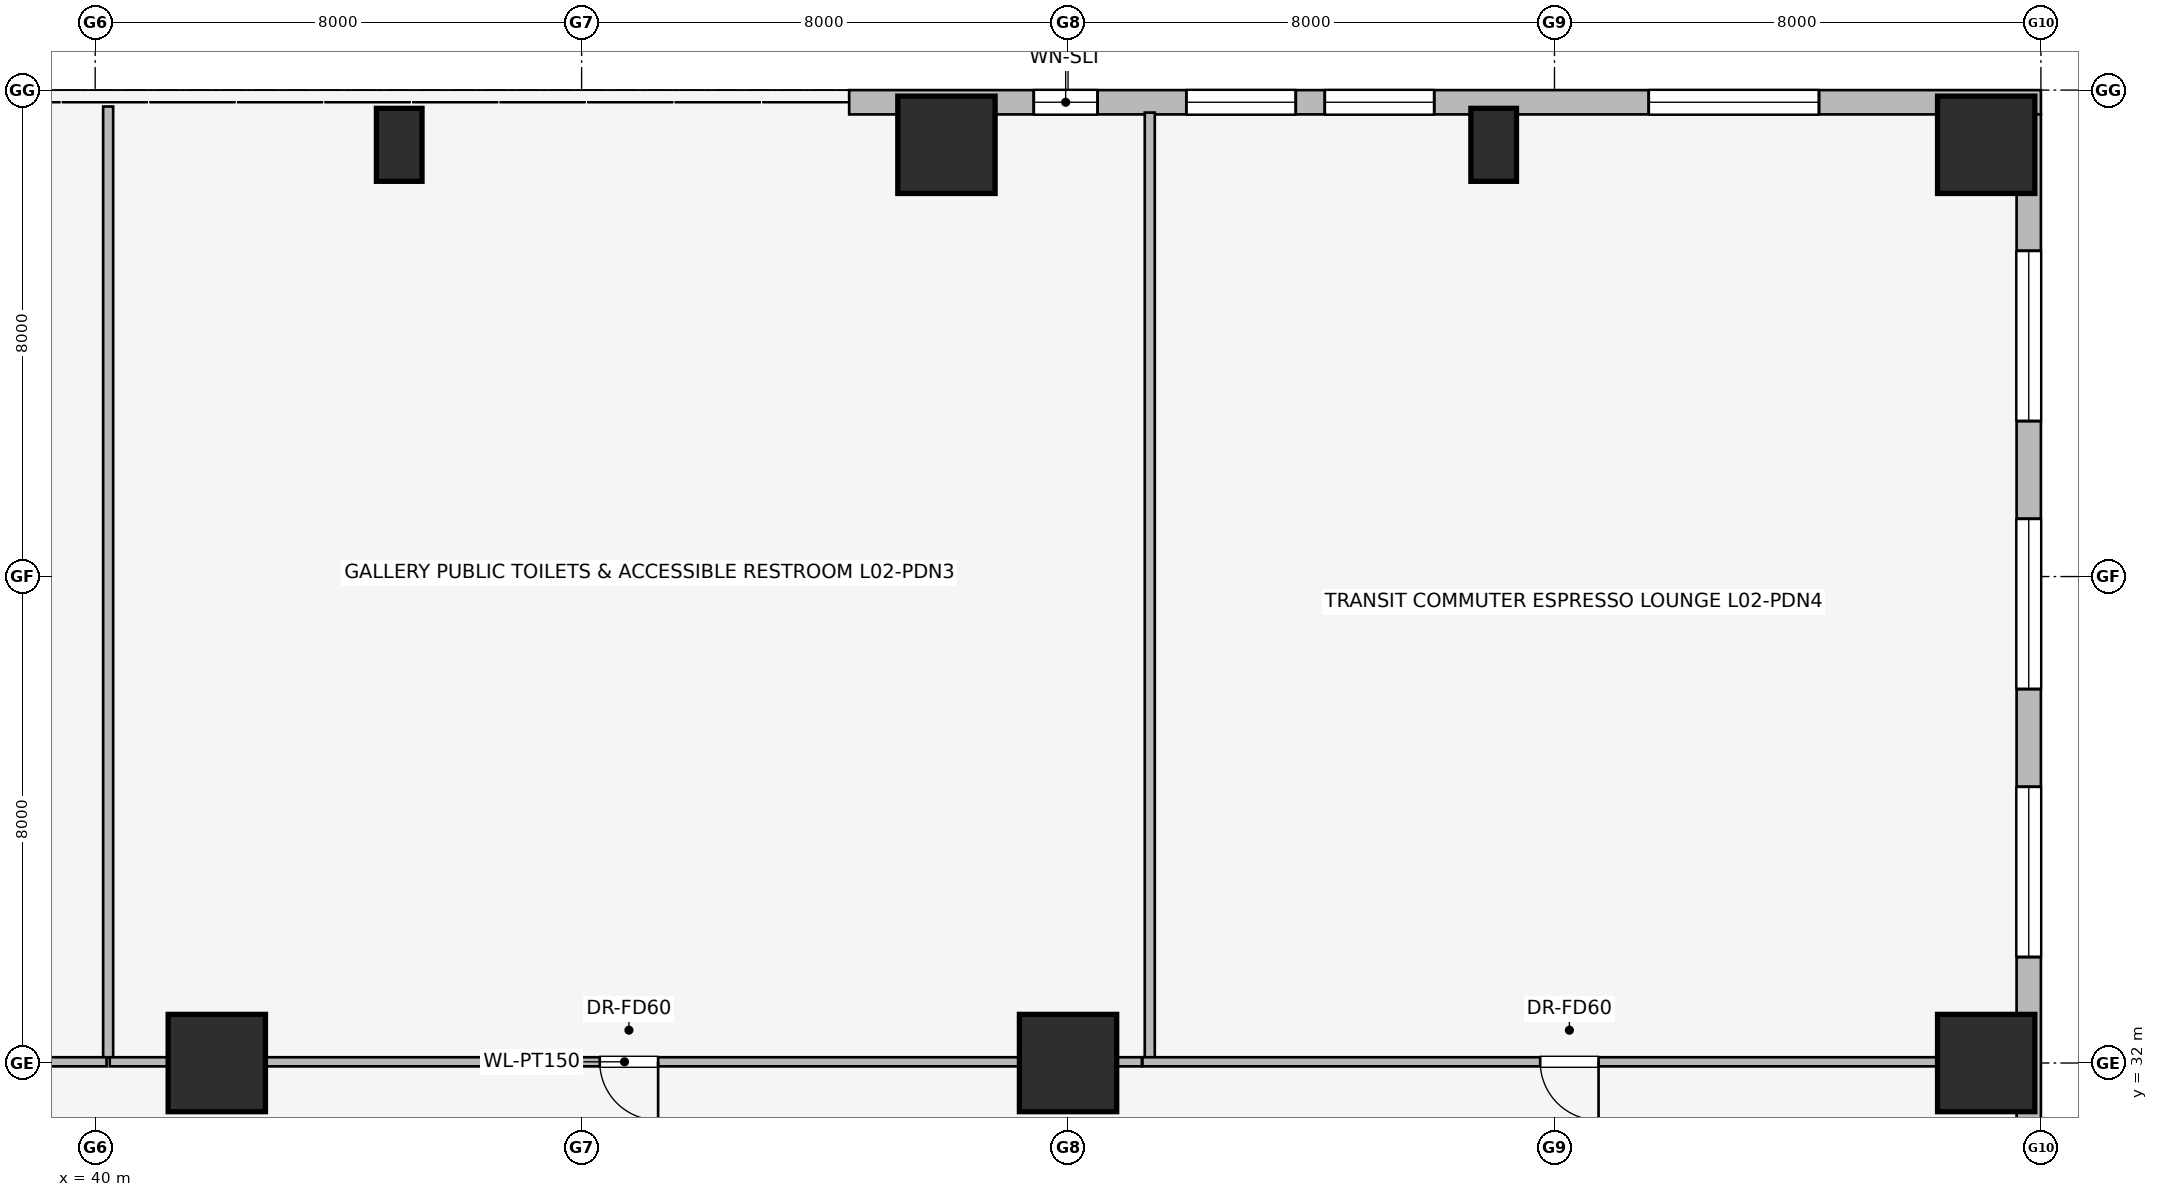
"""IFC4 building model, lengths in metres.
Left out: names, types, materials, properties, quantities, classifications, styles, units other than length and angle.
Written with IfcOpenShell. Run it as: python <this file> out.ifc"""

import sys

from ifc_helpers import new_model, si_unit, direction, frame, frame_2d, origin, origin_2d, place, context, subcontext, project, spatial, rectangle, extrude, element, fill, save


model = new_model("IFC4")
c1 = context("Model", 3, precision=1e-05, world=origin(), true_north=direction((0.0, 1.0)))
c2 = subcontext(c1, "Body", "Model", "MODEL_VIEW")
j1 = project(units=[si_unit("LENGTHUNIT", "METRE"), si_unit("PLANEANGLEUNIT", "RADIAN")], contexts=[c1])
p1 = place(None, origin())
s1 = spatial("IfcSite", under=j1, at=p1, CompositionType="ELEMENT")
p2 = place(p1, origin())
s2 = spatial("IfcBuilding", under=s1, at=p2, CompositionType="ELEMENT")
p3 = place(p2, frame((0.0, 0.0, 6.0)))
s3 = spatial("IfcBuildingStorey", under=s2, at=p3, CompositionType="ELEMENT", Elevation=6.0)
for number, where, z_axis, x_axis in (
    (1, (71.1, 47.1, 0.0), (0.0, 0.0, 1.0), (1.0, 0.0, 0.0)),
    (2, (54.0, 47.1, 0.0), (0.0, 0.0, 1.0), (1.0, 0.0, 0.0)),
    (3, (71.1, 32.0, 0.0), (0.0, 0.0, 1.0), (1.0, 0.0, 0.0)),
    (4, (42.0, 32.0, 0.0), (0.0, 0.0, 1.0), (1.0, 0.0, 0.0)),
    (5, (56.0, 32.0, 0.0), (0.0, 0.0, 1.0), (1.0, 0.0, 0.0)),
):
    element("IfcColumn", number, at=place(p3, frame(where, z_axis=z_axis, x_axis=x_axis)), inside=s3, PredefinedType="COLUMN", context=c2, shape_type="SweptSolid", body=[
        extrude(rectangle(XDim=1.6, YDim=1.6, at=origin_2d()), origin(), (0.0, 0.0, 1.0), 5.0),
    ])
for number, where, z_axis, x_axis in (
    (6, (45.0, 47.1, 0.0), (0.0, 0.0, 1.0), (1.0, 0.0, 0.0)),
    (7, (63.0, 47.1, 0.0), (0.0, 0.0, 1.0), (1.0, 0.0, 0.0)),
):
    element("IfcColumn", number, at=place(p3, frame(where, z_axis=z_axis, x_axis=x_axis)), inside=s3, PredefinedType="PILASTER", context=c2, shape_type="SweptSolid", body=[
        extrude(rectangle(XDim=0.75, YDim=1.2, at=origin_2d()), origin(), (0.0, 0.0, 1.0), 5.0),
    ])
p4 = place(p3, frame((52.4, 47.8, 0.0), z_axis=(0.0, 0.0, 1.0), x_axis=(1.0, 0.0, 0.0)))
e8 = element("IfcWall", 8, at=p4, inside=s3, PredefinedType="STANDARD", context=c2, shape_type="SweptSolid", body=[
    extrude(rectangle(XDim=19.6, YDim=0.4, at=frame_2d((9.8, 0.0))), origin(), (0.0, 0.0, 1.0), 4.69),
])
p5 = place(p4, frame((3.036, 0.0, 0.75)))
e9 = element("IfcOpeningElement", 9, at=p5, cuts=e8, PredefinedType="OPENING", context=c2, shape_type="SweptSolid", body=[
    extrude(rectangle(XDim=1.05, YDim=1.4, at=frame_2d((0.525, 0.7))), frame((0.0, 0.21, 0.0), z_axis=(0.0, -1.0, 0.0), x_axis=(1.0, 0.0, 0.0)), (0.0, 0.0, 1.0), 0.42),
])
p6 = place(p4, frame((5.545, 0.0, 0.75)))
e10 = element("IfcOpeningElement", 10, at=p6, cuts=e8, PredefinedType="OPENING", context=c2, shape_type="SweptSolid", body=[
    extrude(rectangle(XDim=1.8, YDim=1.5, at=frame_2d((0.9, 0.75))), frame((0.0, 0.21, 0.0), z_axis=(0.0, -1.0, 0.0), x_axis=(1.0, 0.0, 0.0)), (0.0, 0.0, 1.0), 0.42),
])
p7 = place(p4, frame((7.822, 0.0, 0.75)))
e11 = element("IfcOpeningElement", 11, at=p7, cuts=e8, PredefinedType="OPENING", context=c2, shape_type="SweptSolid", body=[
    extrude(rectangle(XDim=1.8, YDim=1.5, at=frame_2d((0.9, 0.75))), frame((0.0, 0.21, 0.0), z_axis=(0.0, -1.0, 0.0), x_axis=(1.0, 0.0, 0.0)), (0.0, 0.0, 1.0), 0.42),
])
p8 = place(p4, frame((13.15, 0.0, 0.75)))
e12 = element("IfcOpeningElement", 12, at=p8, cuts=e8, PredefinedType="OPENING", context=c2, shape_type="SweptSolid", body=[
    extrude(rectangle(XDim=2.8, YDim=1.8, at=frame_2d((1.4, 0.9))), frame((0.0, 0.21, 0.0), z_axis=(0.0, -1.0, 0.0), x_axis=(1.0, 0.0, 0.0)), (0.0, 0.0, 1.0), 0.42),
])
p9 = place(p3, frame((71.8, 47.6, 0.0), z_axis=(0.0, 0.0, 1.0), x_axis=(0.0, -1.0, 0.0)))
e13 = element("IfcWall", 13, at=p9, inside=s3, PredefinedType="STANDARD", context=c2, shape_type="SweptSolid", body=[
    extrude(rectangle(XDim=23.6, YDim=0.4, at=frame_2d((11.8, 0.0))), origin(), (0.0, 0.0, 1.0), 4.69),
])
p10 = place(p9, frame((2.243, 0.0, 0.75)))
e14 = element("IfcOpeningElement", 14, at=p10, cuts=e13, PredefinedType="OPENING", context=c2, shape_type="SweptSolid", body=[
    extrude(rectangle(XDim=2.8, YDim=1.8, at=frame_2d((1.4, 0.9))), frame((0.0, 0.21, 0.0), z_axis=(0.0, -1.0, 0.0), x_axis=(1.0, 0.0, 0.0)), (0.0, 0.0, 1.0), 0.42),
])
p11 = place(p9, frame((6.65, 0.0, 0.75)))
e15 = element("IfcOpeningElement", 15, at=p11, cuts=e13, PredefinedType="OPENING", context=c2, shape_type="SweptSolid", body=[
    extrude(rectangle(XDim=2.8, YDim=1.8, at=frame_2d((1.4, 0.9))), frame((0.0, 0.21, 0.0), z_axis=(0.0, -1.0, 0.0), x_axis=(1.0, 0.0, 0.0)), (0.0, 0.0, 1.0), 0.42),
])
p12 = place(p9, frame((11.057, 0.0, 0.75)))
e16 = element("IfcOpeningElement", 16, at=p12, cuts=e13, PredefinedType="OPENING", context=c2, shape_type="SweptSolid", body=[
    extrude(rectangle(XDim=2.8, YDim=1.8, at=frame_2d((1.4, 0.9))), frame((0.0, 0.21, 0.0), z_axis=(0.0, -1.0, 0.0), x_axis=(1.0, 0.0, 0.0)), (0.0, 0.0, 1.0), 0.42),
])
p13 = place(p9, frame((17.268, 0.0, 0.75)))
e17 = element("IfcOpeningElement", 17, at=p13, cuts=e13, PredefinedType="OPENING", context=c2, shape_type="SweptSolid", body=[
    extrude(rectangle(XDim=1.8, YDim=1.5, at=frame_2d((0.9, 0.75))), frame((0.0, 0.21, 0.0), z_axis=(0.0, -1.0, 0.0), x_axis=(1.0, 0.0, 0.0)), (0.0, 0.0, 1.0), 0.42),
])
p14 = place(p9, frame((20.523, 0.0, 0.75)))
e18 = element("IfcOpeningElement", 18, at=p14, cuts=e13, PredefinedType="OPENING", context=c2, shape_type="SweptSolid", body=[
    extrude(rectangle(XDim=1.8, YDim=1.5, at=frame_2d((0.9, 0.75))), frame((0.0, 0.21, 0.0), z_axis=(0.0, -1.0, 0.0), x_axis=(1.0, 0.0, 0.0)), (0.0, 0.0, 1.0), 0.42),
])
p15 = place(p3, frame((40.213, 32.09, 0.0), z_axis=(0.0, 0.0, 1.0), x_axis=(0.0, 1.0, 0.0)))
e19 = element("IfcWall", 19, at=p15, inside=s3, PredefinedType="PARTITIONING", context=c2, shape_type="SweptSolid", body=[
    extrude(rectangle(XDim=15.64, YDim=0.165, at=frame_2d((7.82, 0.0))), origin(), (0.0, 0.0, 1.0), 4.082),
])
p16 = place(p3, frame((57.344, 32.09, 0.0), z_axis=(0.0, 0.0, 1.0), x_axis=(0.0, 1.0, 0.0)))
e20 = element("IfcWall", 20, at=p16, inside=s3, PredefinedType="PARTITIONING", context=c2, shape_type="SweptSolid", body=[
    extrude(rectangle(XDim=15.54, YDim=0.165, at=frame_2d((7.77, 0.0))), origin(), (0.0, 0.0, 1.0), 4.69),
])
p17 = place(p3, frame((40.187, 32.02, 0.0), z_axis=(0.0, 0.0, 1.0), x_axis=(-1.0, 0.0, 0.0)))
e21 = element("IfcWall", 21, at=p17, inside=s3, PredefinedType="PARTITIONING", context=c2, shape_type="SweptSolid", body=[
    extrude(rectangle(XDim=7.646, YDim=0.15, at=frame_2d((3.823, 0.0))), origin(), (0.0, 0.0, 1.0), 4.69),
])
p18 = place(p17, frame((3.343, 0.0, 0.0)))
e22 = element("IfcOpeningElement", 22, at=p18, cuts=e21, PredefinedType="OPENING", context=c2, shape_type="SweptSolid", body=[
    extrude(rectangle(XDim=0.96, YDim=2.0, at=frame_2d((0.48, 1.0))), frame((0.0, 0.085, 0.0), z_axis=(0.0, -1.0, 0.0), x_axis=(1.0, 0.0, 0.0)), (0.0, 0.0, 1.0), 0.17),
])
p19 = place(p3, frame((57.214, 32.02, 0.0), z_axis=(0.0, 0.0, 1.0), x_axis=(-1.0, 0.0, 0.0)))
e23 = element("IfcWall", 23, at=p19, inside=s3, PredefinedType="PARTITIONING", context=c2, shape_type="SweptSolid", body=[
    extrude(rectangle(XDim=16.975, YDim=0.15, at=frame_2d((8.488, 0.0))), origin(), (0.0, 0.0, 1.0), 3.742),
])
p20 = place(p19, frame((7.956, 0.0, 0.0)))
e24 = element("IfcOpeningElement", 24, at=p20, cuts=e23, PredefinedType="OPENING", context=c2, shape_type="SweptSolid", body=[
    extrude(rectangle(XDim=0.96, YDim=2.0, at=frame_2d((0.48, 1.0))), frame((0.0, 0.085, 0.0), z_axis=(0.0, -1.0, 0.0), x_axis=(1.0, 0.0, 0.0)), (0.0, 0.0, 1.0), 0.17),
])
p21 = place(p3, frame((71.605, 32.02, 0.0), z_axis=(0.0, 0.0, 1.0), x_axis=(-1.0, 0.0, 0.0)))
e25 = element("IfcWall", 25, at=p21, inside=s3, PredefinedType="PARTITIONING", context=c2, shape_type="SweptSolid", body=[
    extrude(rectangle(XDim=14.381, YDim=0.15, at=frame_2d((7.19, 0.0))), origin(), (0.0, 0.0, 1.0), 3.742),
])
p22 = place(p21, frame((6.88, 0.0, 0.0)))
e26 = element("IfcOpeningElement", 26, at=p22, cuts=e25, PredefinedType="OPENING", context=c2, shape_type="SweptSolid", body=[
    extrude(rectangle(XDim=0.96, YDim=2.0, at=frame_2d((0.48, 1.0))), frame((0.0, 0.085, 0.0), z_axis=(0.0, -1.0, 0.0), x_axis=(1.0, 0.0, 0.0)), (0.0, 0.0, 1.0), 0.17),
])
p23 = place(p5, origin())
e27 = element("IfcWindow", 27, at=p23, inside=s3, PartitioningType="SINGLE_PANEL", PredefinedType="WINDOW", context=c2, shape_type="SweptSolid", body=[
    extrude(rectangle(XDim=1.05, YDim=1.4, at=frame_2d((0.525, 0.7))), frame((0.0, 0.03, 0.0), z_axis=(0.0, -1.0, 0.0), x_axis=(1.0, 0.0, 0.0)), (0.0, 0.0, 1.0), 0.06),
])
fill(e9, e27)
p24 = place(p6, origin())
e28 = element("IfcWindow", 28, at=p24, inside=s3, PartitioningType="SINGLE_PANEL", PredefinedType="WINDOW", context=c2, shape_type="SweptSolid", body=[
    extrude(rectangle(XDim=1.8, YDim=1.5, at=frame_2d((0.9, 0.75))), frame((0.0, 0.03, 0.0), z_axis=(0.0, -1.0, 0.0), x_axis=(1.0, 0.0, 0.0)), (0.0, 0.0, 1.0), 0.06),
])
fill(e10, e28)
p25 = place(p7, origin())
e29 = element("IfcWindow", 29, at=p25, inside=s3, PartitioningType="SINGLE_PANEL", PredefinedType="WINDOW", context=c2, shape_type="SweptSolid", body=[
    extrude(rectangle(XDim=1.8, YDim=1.5, at=frame_2d((0.9, 0.75))), frame((0.0, 0.03, 0.0), z_axis=(0.0, -1.0, 0.0), x_axis=(1.0, 0.0, 0.0)), (0.0, 0.0, 1.0), 0.06),
])
fill(e11, e29)
p26 = place(p8, origin())
e30 = element("IfcWindow", 30, at=p26, inside=s3, PartitioningType="SINGLE_PANEL", PredefinedType="WINDOW", context=c2, shape_type="SweptSolid", body=[
    extrude(rectangle(XDim=2.8, YDim=1.8, at=frame_2d((1.4, 0.9))), frame((0.0, 0.03, 0.0), z_axis=(0.0, -1.0, 0.0), x_axis=(1.0, 0.0, 0.0)), (0.0, 0.0, 1.0), 0.06),
])
fill(e12, e30)
p27 = place(p10, origin())
e31 = element("IfcWindow", 31, at=p27, inside=s3, PartitioningType="SINGLE_PANEL", PredefinedType="WINDOW", context=c2, shape_type="SweptSolid", body=[
    extrude(rectangle(XDim=2.8, YDim=1.8, at=frame_2d((1.4, 0.9))), frame((0.0, 0.03, 0.0), z_axis=(0.0, -1.0, 0.0), x_axis=(1.0, 0.0, 0.0)), (0.0, 0.0, 1.0), 0.06),
])
fill(e14, e31)
p28 = place(p11, origin())
e32 = element("IfcWindow", 32, at=p28, inside=s3, PartitioningType="SINGLE_PANEL", PredefinedType="WINDOW", context=c2, shape_type="SweptSolid", body=[
    extrude(rectangle(XDim=2.8, YDim=1.8, at=frame_2d((1.4, 0.9))), frame((0.0, 0.03, 0.0), z_axis=(0.0, -1.0, 0.0), x_axis=(1.0, 0.0, 0.0)), (0.0, 0.0, 1.0), 0.06),
])
fill(e15, e32)
p29 = place(p12, origin())
e33 = element("IfcWindow", 33, at=p29, inside=s3, PartitioningType="SINGLE_PANEL", PredefinedType="WINDOW", context=c2, shape_type="SweptSolid", body=[
    extrude(rectangle(XDim=2.8, YDim=1.8, at=frame_2d((1.4, 0.9))), frame((0.0, 0.03, 0.0), z_axis=(0.0, -1.0, 0.0), x_axis=(1.0, 0.0, 0.0)), (0.0, 0.0, 1.0), 0.06),
])
fill(e16, e33)
p30 = place(p20, origin())
e34 = element("IfcDoor", 34, at=p30, inside=s3, OperationType="SINGLE_SWING_LEFT", PredefinedType="DOOR", context=c2, shape_type="SweptSolid", body=[
    extrude(rectangle(XDim=0.96, YDim=2.0, at=frame_2d((0.48, 1.0))), frame((0.0, 0.025, 0.0), z_axis=(0.0, -1.0, 0.0), x_axis=(1.0, 0.0, 0.0)), (0.0, 0.0, 1.0), 0.05),
])
fill(e24, e34)
p31 = place(p22, origin())
e35 = element("IfcDoor", 35, at=p31, inside=s3, OperationType="SINGLE_SWING_LEFT", PredefinedType="DOOR", context=c2, shape_type="SweptSolid", body=[
    extrude(rectangle(XDim=0.96, YDim=2.0, at=frame_2d((0.48, 1.0))), frame((0.0, 0.025, 0.0), z_axis=(0.0, -1.0, 0.0), x_axis=(1.0, 0.0, 0.0)), (0.0, 0.0, 1.0), 0.05),
])
fill(e26, e35)
save(model, sys.argv[1])
